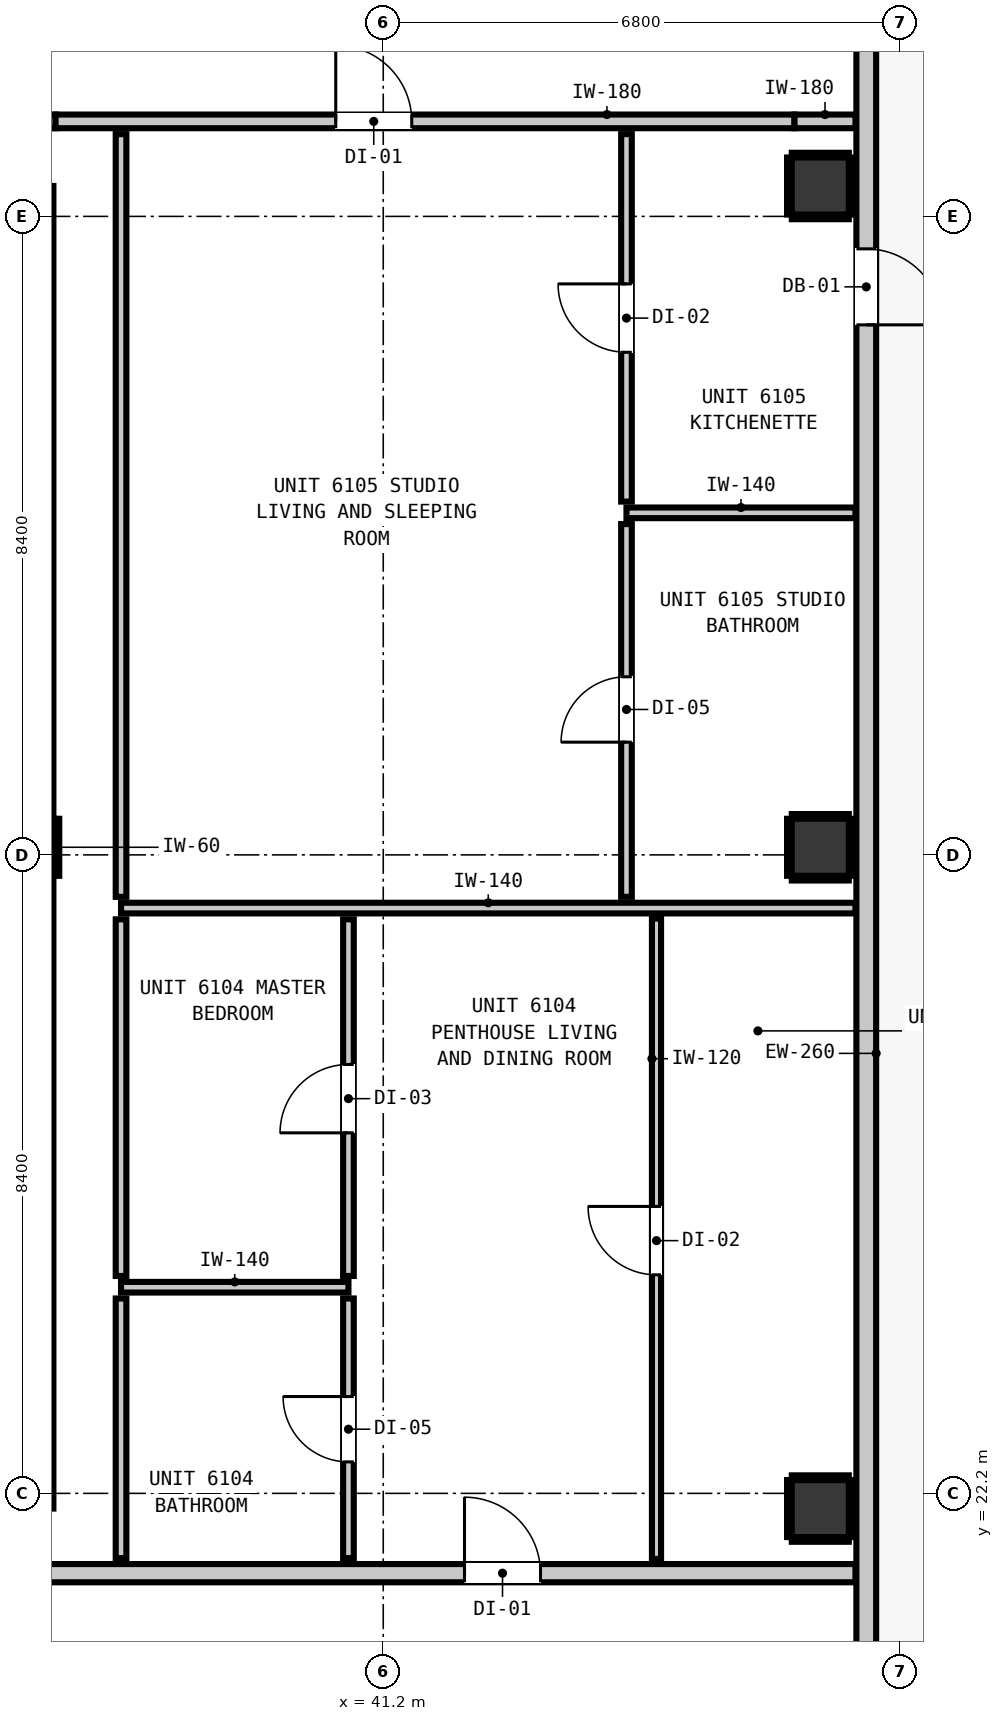
"""IFC4 building model, lengths in metres.
Left out: names, types, materials, properties, quantities, classifications, styles, units other than length and angle.
Written with IfcOpenShell. Run it as: python <this file> out.ifc"""

import sys

from ifc_helpers import new_model, si_unit, direction, frame, frame_2d, origin, origin_2d, place, context, subcontext, project, spatial, rectangle, extrude, element, fill, save


model = new_model("IFC4")
c1 = context("Model", 3, precision=1e-05, world=origin(), true_north=direction((0.0, 1.0)))
c2 = subcontext(c1, "Body", "Model", "MODEL_VIEW")
j1 = project(units=[si_unit("LENGTHUNIT", "METRE"), si_unit("PLANEANGLEUNIT", "RADIAN")], contexts=[c1])
p1 = place(None, origin())
s1 = spatial("IfcSite", under=j1, at=p1, CompositionType="ELEMENT")
p2 = place(p1, origin())
s2 = spatial("IfcBuilding", under=s1, at=p2, CompositionType="ELEMENT")
p3 = place(p2, frame((0.0, 0.0, 210.08)))
s3 = spatial("IfcBuildingStorey", under=s2, at=p3, CompositionType="ELEMENT", Elevation=210.08)
p4 = place(p3, frame((36.5, 30.7, 0.0), z_axis=(0.0, 0.0, 1.0), x_axis=(1.0, 0.0, 0.0)))
e1 = element("IfcColumn", 1, at=p4, inside=s3, PredefinedType="COLUMN", context=c2, shape_type="SweptSolid", body=[
    extrude(rectangle(XDim=0.75, YDim=0.75, at=origin_2d()), origin(), (0.0, 0.0, 1.0), 3.32),
])
p5 = place(p3, frame((36.46, 22.0, 0.0), z_axis=(0.0, 0.0, 1.0), x_axis=(0.0, 1.0, 0.0)))
e2 = element("IfcWall", 2, at=p5, inside=s3, PredefinedType="SHEAR", context=c2, shape_type="SweptSolid", body=[
    extrude(rectangle(XDim=8.32, YDim=0.8, at=frame_2d((4.16, 0.0))), origin(), (0.0, 0.0, 1.0), 3.32),
])
p6 = place(p3, frame((36.46, 31.08, 0.0), z_axis=(0.0, 0.0, 1.0), x_axis=(0.0, 1.0, 0.0)))
e3 = element("IfcWall", 3, at=p6, inside=s3, PredefinedType="SHEAR", context=c2, shape_type="SweptSolid", body=[
    extrude(rectangle(XDim=8.32, YDim=0.8, at=frame_2d((4.16, 0.0))), origin(), (0.0, 0.0, 1.0), 3.32),
])
for number, where, z_axis, x_axis in (
    (4, (46.95, 22.0, -0.2), (0.0, 0.0, 1.0), (1.0, 0.0, 0.0)),
    (5, (46.95, 30.7, -0.2), (0.0, 0.0, 1.0), (1.0, 0.0, 0.0)),
    (6, (46.95, 39.4, -0.2), (0.0, 0.0, 1.0), (1.0, 0.0, 0.0)),
):
    element("IfcColumn", number, at=place(p3, frame(where, z_axis=z_axis, x_axis=x_axis)), inside=s3, PredefinedType="COLUMN", context=c2, shape_type="SweptSolid", body=[
        extrude(rectangle(XDim=0.75, YDim=0.75, at=origin_2d()), origin(), (0.0, 0.0, 1.0), 3.52),
    ])
p7 = place(p3, frame((47.555, 42.655, 0.0), z_axis=(0.0, 0.0, 1.0), x_axis=(0.0, -1.0, 0.0)))
e7 = element("IfcWall", 7, at=p7, inside=s3, PredefinedType="STANDARD", context=c2, shape_type="SweptSolid", body=[
    extrude(rectangle(XDim=30.31, YDim=0.26, at=frame_2d((15.155, 0.0))), origin(), (0.0, 0.0, 1.0), 3.1),
])
p8 = place(p7, frame((4.082, 0.0, 0.0)))
e8 = element("IfcOpeningElement", 8, at=p8, cuts=e7, PredefinedType="OPENING", context=c2, shape_type="SweptSolid", body=[
    extrude(rectangle(XDim=1.0, YDim=2.15, at=frame_2d((0.5, 1.075))), frame((0.0, 0.14, 0.0), z_axis=(0.0, -1.0, 0.0), x_axis=(1.0, 0.0, 0.0)), (0.0, 0.0, 1.0), 0.28),
])
p9 = place(p7, frame((24.251, 0.0, 0.85)))
e9 = element("IfcOpeningElement", 9, at=p9, cuts=e7, PredefinedType="OPENING", context=c2, shape_type="SweptSolid", body=[
    extrude(rectangle(XDim=1.8, YDim=1.9, at=frame_2d((0.9, 0.95))), frame((0.0, 0.14, 0.0), z_axis=(0.0, -1.0, 0.0), x_axis=(1.0, 0.0, 0.0)), (0.0, 0.0, 1.0), 0.28),
])
p10 = place(p7, frame((27.808, 0.0, 0.85)))
e10 = element("IfcOpeningElement", 10, at=p10, cuts=e7, PredefinedType="OPENING", context=c2, shape_type="SweptSolid", body=[
    extrude(rectangle(XDim=1.8, YDim=1.9, at=frame_2d((0.9, 0.95))), frame((0.0, 0.14, 0.0), z_axis=(0.0, -1.0, 0.0), x_axis=(1.0, 0.0, 0.0)), (0.0, 0.0, 1.0), 0.28),
])
p11 = place(p3, frame((10.787, 21.15, 0.0), z_axis=(0.0, 0.0, 1.0), x_axis=(1.0, 0.0, 0.0)))
e11 = element("IfcWall", 11, at=p11, inside=s3, PredefinedType="PARTITIONING", context=c2, shape_type="SweptSolid", body=[
    extrude(rectangle(XDim=36.626, YDim=0.24, at=frame_2d((18.313, 0.0))), origin(), (0.0, 0.0, 1.0), 3.1),
])
p12 = place(p11, frame((7.423, 0.0, 0.0)))
e12 = element("IfcOpeningElement", 12, at=p12, cuts=e11, PredefinedType="OPENING", context=c2, shape_type="SweptSolid", body=[
    extrude(rectangle(XDim=1.1, YDim=2.15, at=frame_2d((0.55, 1.075))), frame((0.0, 0.13, 0.0), z_axis=(0.0, -1.0, 0.0), x_axis=(1.0, 0.0, 0.0)), (0.0, 0.0, 1.0), 0.26),
])
p13 = place(p11, frame((31.482, 0.0, 0.0)))
e13 = element("IfcOpeningElement", 13, at=p13, cuts=e11, PredefinedType="OPENING", context=c2, shape_type="SweptSolid", body=[
    extrude(rectangle(XDim=1.0, YDim=2.15, at=frame_2d((0.5, 1.075))), frame((0.0, 0.13, 0.0), z_axis=(0.0, -1.0, 0.0), x_axis=(1.0, 0.0, 0.0)), (0.0, 0.0, 1.0), 0.26),
])
p14 = place(p3, frame((10.787, 40.25, 0.0), z_axis=(0.0, 0.0, 1.0), x_axis=(1.0, 0.0, 0.0)))
e14 = element("IfcWall", 14, at=p14, inside=s3, PredefinedType="PARTITIONING", context=c2, shape_type="SweptSolid", body=[
    extrude(rectangle(XDim=26.102, YDim=0.18, at=frame_2d((13.051, 0.0))), origin(), (0.0, 0.0, 1.0), 3.1),
])
p15 = place(p14, frame((6.648, 0.0, 0.0)))
e15 = element("IfcOpeningElement", 15, at=p15, cuts=e14, PredefinedType="OPENING", context=c2, shape_type="SweptSolid", body=[
    extrude(rectangle(XDim=1.4, YDim=2.15, at=frame_2d((0.7, 1.075))), frame((0.0, 0.1, 0.0), z_axis=(0.0, -1.0, 0.0), x_axis=(1.0, 0.0, 0.0)), (0.0, 0.0, 1.0), 0.2),
])
p16 = place(p3, frame((36.889, 40.25, 0.0), z_axis=(0.0, 0.0, 1.0), x_axis=(1.0, 0.0, 0.0)))
e16 = element("IfcWall", 16, at=p16, inside=s3, PredefinedType="PARTITIONING", context=c2, shape_type="SweptSolid", body=[
    extrude(rectangle(XDim=9.722, YDim=0.18, at=frame_2d((4.861, 0.0))), origin(), (0.0, 0.0, 1.0), 2.477),
])
p17 = place(p16, frame((3.686, 0.0, 0.0)))
e17 = element("IfcOpeningElement", 17, at=p17, cuts=e16, PredefinedType="OPENING", context=c2, shape_type="SweptSolid", body=[
    extrude(rectangle(XDim=1.0, YDim=2.15, at=frame_2d((0.5, 1.075))), frame((0.0, 0.1, 0.0), z_axis=(0.0, -1.0, 0.0), x_axis=(1.0, 0.0, 0.0)), (0.0, 0.0, 1.0), 0.2),
])
p18 = place(p3, frame((46.611, 40.25, 0.0), z_axis=(0.0, 0.0, 1.0), x_axis=(1.0, 0.0, 0.0)))
e18 = element("IfcWall", 18, at=p18, inside=s3, PredefinedType="PARTITIONING", context=c2, shape_type="SweptSolid", body=[
    extrude(rectangle(XDim=0.802, YDim=0.18, at=frame_2d((0.401, 0.0))), origin(), (0.0, 0.0, 1.0), 3.1),
])
p19 = place(p3, frame((37.75, 24.912, 0.0), z_axis=(0.0, 0.0, 1.0), x_axis=(1.0, 0.0, 0.0)))
e19 = element("IfcWall", 19, at=p19, inside=s3, PredefinedType="PARTITIONING", context=c2, shape_type="SweptSolid", body=[
    extrude(rectangle(XDim=2.992, YDim=0.14, at=frame_2d((1.496, 0.0))), origin(), (0.0, 0.0, 1.0), 3.1),
])
p20 = place(p3, frame((37.75, 29.9, 0.0), z_axis=(0.0, 0.0, 1.0), x_axis=(1.0, 0.0, 0.0)))
e20 = element("IfcWall", 20, at=p20, inside=s3, PredefinedType="PARTITIONING", context=c2, shape_type="SweptSolid", body=[
    extrude(rectangle(XDim=9.663, YDim=0.14, at=frame_2d((4.832, 0.0))), origin(), (0.0, 0.0, 1.0), 3.1),
])
p21 = place(p3, frame((44.4, 35.1, 0.0), z_axis=(0.0, 0.0, 1.0), x_axis=(1.0, 0.0, 0.0)))
e21 = element("IfcWall", 21, at=p21, inside=s3, PredefinedType="PARTITIONING", context=c2, shape_type="SweptSolid", body=[
    extrude(rectangle(XDim=3.013, YDim=0.14, at=frame_2d((1.507, 0.0))), origin(), (0.0, 0.0, 1.0), 3.1),
])
p22 = place(p3, frame((37.75, 21.348, 0.0), z_axis=(0.0, 0.0, 1.0), x_axis=(0.0, 1.0, 0.0)))
e22 = element("IfcWall", 22, at=p22, inside=s3, PredefinedType="PARTITIONING", context=c2, shape_type="SweptSolid", body=[
    extrude(rectangle(XDim=3.416, YDim=0.14, at=frame_2d((1.708, 0.0))), origin(), (0.0, 0.0, 1.0), 3.1),
])
p23 = place(p3, frame((37.75, 25.06, 0.0), z_axis=(0.0, 0.0, 1.0), x_axis=(0.0, 1.0, 0.0)))
e23 = element("IfcWall", 23, at=p23, inside=s3, PredefinedType="PARTITIONING", context=c2, shape_type="SweptSolid", body=[
    extrude(rectangle(XDim=4.692, YDim=0.14, at=frame_2d((2.346, 0.0))), origin(), (0.0, 0.0, 1.0), 3.1),
])
p24 = place(p3, frame((37.75, 30.048, 0.0), z_axis=(0.0, 0.0, 1.0), x_axis=(0.0, 1.0, 0.0)))
e24 = element("IfcWall", 24, at=p24, inside=s3, PredefinedType="PARTITIONING", context=c2, shape_type="SweptSolid", body=[
    extrude(rectangle(XDim=10.034, YDim=0.14, at=frame_2d((5.017, 0.0))), origin(), (0.0, 0.0, 1.0), 3.1),
])
p25 = place(p3, frame((40.742, 21.348, 0.0), z_axis=(0.0, 0.0, 1.0), x_axis=(0.0, 1.0, 0.0)))
e25 = element("IfcWall", 25, at=p25, inside=s3, PredefinedType="PARTITIONING", context=c2, shape_type="SweptSolid", body=[
    extrude(rectangle(XDim=3.416, YDim=0.14, at=frame_2d((1.708, 0.0))), origin(), (0.0, 0.0, 1.0), 3.1),
])
p26 = place(p25, frame((1.266, 0.0, 0.0)))
e26 = element("IfcOpeningElement", 26, at=p26, cuts=e25, PredefinedType="OPENING", context=c2, shape_type="SweptSolid", body=[
    extrude(rectangle(XDim=0.86, YDim=2.02, at=frame_2d((0.43, 1.01))), frame((0.0, 0.08, 0.0), z_axis=(0.0, -1.0, 0.0), x_axis=(1.0, 0.0, 0.0)), (0.0, 0.0, 1.0), 0.16),
])
p27 = place(p3, frame((40.742, 25.06, 0.0), z_axis=(0.0, 0.0, 1.0), x_axis=(0.0, 1.0, 0.0)))
e27 = element("IfcWall", 27, at=p27, inside=s3, PredefinedType="PARTITIONING", context=c2, shape_type="SweptSolid", body=[
    extrude(rectangle(XDim=4.692, YDim=0.14, at=frame_2d((2.346, 0.0))), origin(), (0.0, 0.0, 1.0), 3.1),
])
p28 = place(p27, frame((1.883, 0.0, 0.0)))
e28 = element("IfcOpeningElement", 28, at=p28, cuts=e27, PredefinedType="OPENING", context=c2, shape_type="SweptSolid", body=[
    extrude(rectangle(XDim=0.9, YDim=2.1, at=frame_2d((0.45, 1.05))), frame((0.0, 0.08, 0.0), z_axis=(0.0, -1.0, 0.0), x_axis=(1.0, 0.0, 0.0)), (0.0, 0.0, 1.0), 0.16),
])
p29 = place(p3, frame((44.4, 30.048, 0.0), z_axis=(0.0, 0.0, 1.0), x_axis=(0.0, 1.0, 0.0)))
e29 = element("IfcWall", 29, at=p29, inside=s3, PredefinedType="PARTITIONING", context=c2, shape_type="SweptSolid", body=[
    extrude(rectangle(XDim=4.904, YDim=0.14, at=frame_2d((2.452, 0.0))), origin(), (0.0, 0.0, 1.0), 3.1),
])
p30 = place(p29, frame((2.035, 0.0, 0.0)))
e30 = element("IfcOpeningElement", 30, at=p30, cuts=e29, PredefinedType="OPENING", context=c2, shape_type="SweptSolid", body=[
    extrude(rectangle(XDim=0.86, YDim=2.02, at=frame_2d((0.43, 1.01))), frame((0.0, 0.08, 0.0), z_axis=(0.0, -1.0, 0.0), x_axis=(1.0, 0.0, 0.0)), (0.0, 0.0, 1.0), 0.16),
])
p31 = place(p3, frame((44.4, 35.248, 0.0), z_axis=(0.0, 0.0, 1.0), x_axis=(0.0, 1.0, 0.0)))
e31 = element("IfcWall", 31, at=p31, inside=s3, PredefinedType="PARTITIONING", context=c2, shape_type="SweptSolid", body=[
    extrude(rectangle(XDim=4.834, YDim=0.14, at=frame_2d((2.417, 0.0))), origin(), (0.0, 0.0, 1.0), 3.1),
])
p32 = place(p31, frame((1.964, 0.0, 0.0)))
e32 = element("IfcOpeningElement", 32, at=p32, cuts=e31, PredefinedType="OPENING", context=c2, shape_type="SweptSolid", body=[
    extrude(rectangle(XDim=0.9, YDim=2.1, at=frame_2d((0.45, 1.05))), frame((0.0, 0.08, 0.0), z_axis=(0.0, -1.0, 0.0), x_axis=(1.0, 0.0, 0.0)), (0.0, 0.0, 1.0), 0.16),
])
p33 = place(p3, frame((44.795, 21.338, 0.0), z_axis=(0.0, 0.0, 1.0), x_axis=(0.0, 1.0, 0.0)))
e33 = element("IfcWall", 33, at=p33, inside=s3, PredefinedType="PARTITIONING", context=c2, shape_type="SweptSolid", body=[
    extrude(rectangle(XDim=8.424, YDim=0.12, at=frame_2d((4.212, 0.0))), origin(), (0.0, 0.0, 1.0), 3.1),
])
p34 = place(p33, frame((3.737, 0.0, 0.0)))
e34 = element("IfcOpeningElement", 34, at=p34, cuts=e33, PredefinedType="OPENING", context=c2, shape_type="SweptSolid", body=[
    extrude(rectangle(XDim=0.9, YDim=2.1, at=frame_2d((0.45, 1.05))), frame((0.0, 0.07, 0.0), z_axis=(0.0, -1.0, 0.0), x_axis=(1.0, 0.0, 0.0)), (0.0, 0.0, 1.0), 0.14),
])
for number, where, z_axis, x_axis in (
    (35, (36.907, 30.325, 0.0), (0.0, 0.0, 1.0), (0.0, 1.0, 0.0)),
    (36, (46.575, 21.593, 0.0), (0.0, 0.0, 1.0), (1.0, 0.0, 0.0)),
    (37, (46.575, 22.407, 0.0), (0.0, 0.0, 1.0), (1.0, 0.0, 0.0)),
    (38, (46.543, 21.625, 0.0), (0.0, 0.0, 1.0), (0.0, 1.0, 0.0)),
    (39, (47.357, 21.625, 0.0), (0.0, 0.0, 1.0), (0.0, 1.0, 0.0)),
    (40, (46.575, 30.293, 0.0), (0.0, 0.0, 1.0), (1.0, 0.0, 0.0)),
    (41, (46.575, 31.107, 0.0), (0.0, 0.0, 1.0), (1.0, 0.0, 0.0)),
    (42, (46.543, 30.325, 0.0), (0.0, 0.0, 1.0), (0.0, 1.0, 0.0)),
    (43, (47.357, 30.325, 0.0), (0.0, 0.0, 1.0), (0.0, 1.0, 0.0)),
    (44, (46.575, 38.993, 0.0), (0.0, 0.0, 1.0), (1.0, 0.0, 0.0)),
    (45, (46.575, 39.807, 0.0), (0.0, 0.0, 1.0), (1.0, 0.0, 0.0)),
    (46, (46.543, 39.025, 0.0), (0.0, 0.0, 1.0), (0.0, 1.0, 0.0)),
    (47, (47.357, 39.025, 0.0), (0.0, 0.0, 1.0), (0.0, 1.0, 0.0)),
):
    element("IfcWall", number, at=place(p3, frame(where, z_axis=z_axis, x_axis=x_axis)), inside=s3, PredefinedType="PARTITIONING", context=c2, shape_type="SweptSolid", body=[
        extrude(rectangle(XDim=0.75, YDim=0.06, at=frame_2d((0.375, 0.0))), origin(), (0.0, 0.0, 1.0), 1.45),
    ])
p35 = place(p8, origin())
e48 = element("IfcDoor", 48, at=p35, inside=s3, OperationType="SINGLE_SWING_RIGHT", PredefinedType="DOOR", context=c2, shape_type="SweptSolid", body=[
    extrude(rectangle(XDim=1.0, YDim=2.15, at=frame_2d((0.5, 1.075))), frame((0.0, 0.025, 0.0), z_axis=(0.0, -1.0, 0.0), x_axis=(1.0, 0.0, 0.0)), (0.0, 0.0, 1.0), 0.05),
])
fill(e8, e48)
p36 = place(p13, origin())
e49 = element("IfcDoor", 49, at=p36, inside=s3, OperationType="SINGLE_SWING_LEFT", PredefinedType="DOOR", context=c2, shape_type="SweptSolid", body=[
    extrude(rectangle(XDim=1.0, YDim=2.15, at=frame_2d((0.5, 1.075))), frame((0.0, 0.025, 0.0), z_axis=(0.0, -1.0, 0.0), x_axis=(1.0, 0.0, 0.0)), (0.0, 0.0, 1.0), 0.05),
])
fill(e13, e49)
p37 = place(p26, origin())
e50 = element("IfcDoor", 50, at=p37, inside=s3, OperationType="SINGLE_SWING_RIGHT", PredefinedType="DOOR", context=c2, shape_type="SweptSolid", body=[
    extrude(rectangle(XDim=0.86, YDim=2.02, at=frame_2d((0.43, 1.01))), frame((0.0, 0.025, 0.0), z_axis=(0.0, -1.0, 0.0), x_axis=(1.0, 0.0, 0.0)), (0.0, 0.0, 1.0), 0.05),
])
fill(e26, e50)
p38 = place(p28, origin())
e51 = element("IfcDoor", 51, at=p38, inside=s3, OperationType="SINGLE_SWING_LEFT", PredefinedType="DOOR", context=c2, shape_type="SweptSolid", body=[
    extrude(rectangle(XDim=0.9, YDim=2.1, at=frame_2d((0.45, 1.05))), frame((0.0, 0.025, 0.0), z_axis=(0.0, -1.0, 0.0), x_axis=(1.0, 0.0, 0.0)), (0.0, 0.0, 1.0), 0.05),
])
fill(e28, e51)
p39 = place(p34, origin())
e52 = element("IfcDoor", 52, at=p39, inside=s3, OperationType="SINGLE_SWING_RIGHT", PredefinedType="DOOR", context=c2, shape_type="SweptSolid", body=[
    extrude(rectangle(XDim=0.9, YDim=2.1, at=frame_2d((0.45, 1.05))), frame((0.0, 0.025, 0.0), z_axis=(0.0, -1.0, 0.0), x_axis=(1.0, 0.0, 0.0)), (0.0, 0.0, 1.0), 0.05),
])
fill(e34, e52)
p40 = place(p17, origin())
e53 = element("IfcDoor", 53, at=p40, inside=s3, OperationType="SINGLE_SWING_LEFT", PredefinedType="DOOR", context=c2, shape_type="SweptSolid", body=[
    extrude(rectangle(XDim=1.0, YDim=2.15, at=frame_2d((0.5, 1.075))), frame((0.0, 0.025, 0.0), z_axis=(0.0, -1.0, 0.0), x_axis=(1.0, 0.0, 0.0)), (0.0, 0.0, 1.0), 0.05),
])
fill(e17, e53)
p41 = place(p32, origin())
e54 = element("IfcDoor", 54, at=p41, inside=s3, OperationType="SINGLE_SWING_RIGHT", PredefinedType="DOOR", context=c2, shape_type="SweptSolid", body=[
    extrude(rectangle(XDim=0.9, YDim=2.1, at=frame_2d((0.45, 1.05))), frame((0.0, 0.025, 0.0), z_axis=(0.0, -1.0, 0.0), x_axis=(1.0, 0.0, 0.0)), (0.0, 0.0, 1.0), 0.05),
])
fill(e32, e54)
p42 = place(p30, origin())
e55 = element("IfcDoor", 55, at=p42, inside=s3, OperationType="SINGLE_SWING_LEFT", PredefinedType="DOOR", context=c2, shape_type="SweptSolid", body=[
    extrude(rectangle(XDim=0.86, YDim=2.02, at=frame_2d((0.43, 1.01))), frame((0.0, 0.025, 0.0), z_axis=(0.0, -1.0, 0.0), x_axis=(1.0, 0.0, 0.0)), (0.0, 0.0, 1.0), 0.05),
])
fill(e30, e55)
save(model, sys.argv[1])
